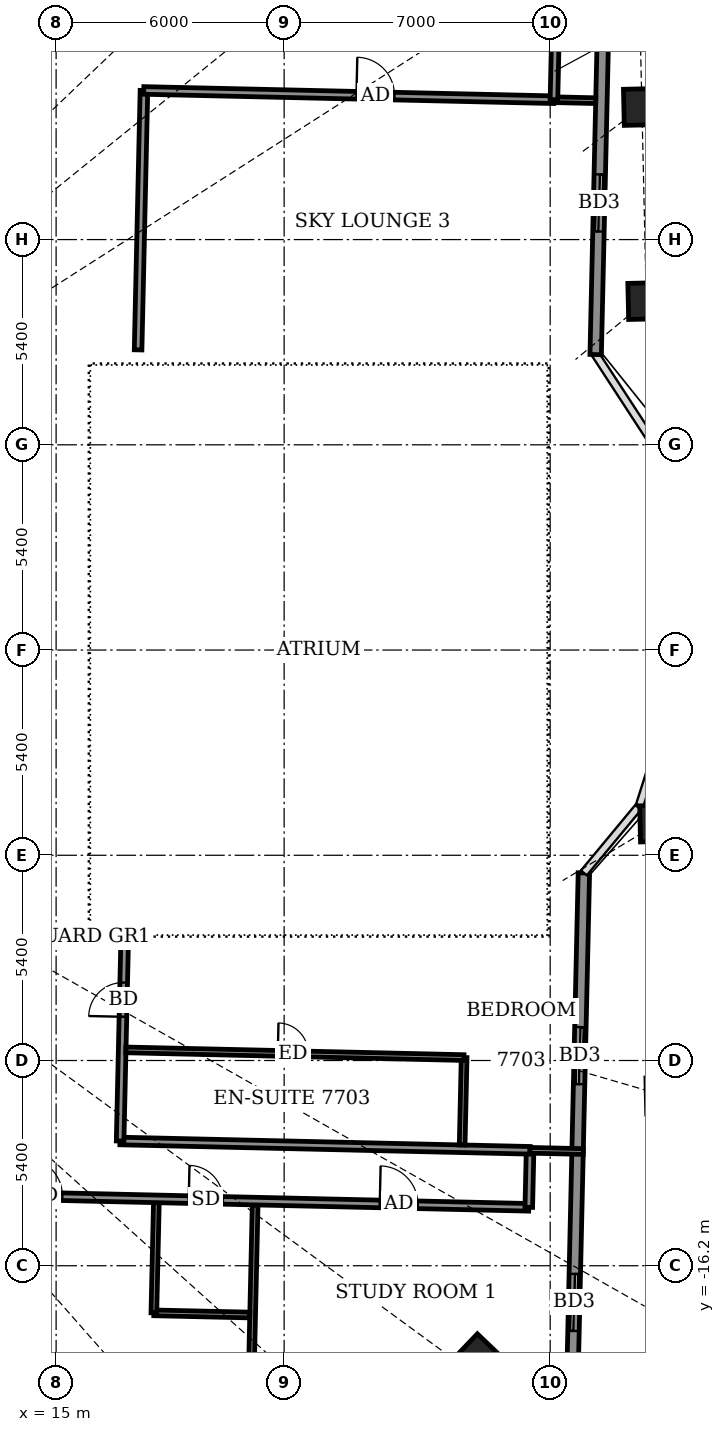
"""IFC4 building model, lengths in metres.
Left out: names, types, materials, properties, quantities, classifications, styles, units other than length and angle.
Written with IfcOpenShell. Run it as: python <this file> out.ifc"""

import sys

from ifc_helpers import new_model, si_unit, direction, frame, frame_2d, origin, origin_2d, place, context, subcontext, project, spatial, rectangle, extrude, element, fill, save


model = new_model("IFC4")
c1 = context("Model", 3, precision=1e-05, world=origin(), true_north=direction((0.0, 1.0)))
c2 = subcontext(c1, "Body", "Model", "MODEL_VIEW")
j1 = project(units=[si_unit("LENGTHUNIT", "METRE"), si_unit("PLANEANGLEUNIT", "RADIAN")], contexts=[c1])
p1 = place(None, origin())
s1 = spatial("IfcSite", under=j1, at=p1, CompositionType="ELEMENT")
p2 = place(p1, origin())
s2 = spatial("IfcBuilding", under=s1, at=p2, CompositionType="ELEMENT")
p3 = place(p2, frame((0.0, 0.0, 301.5)))
s3 = spatial("IfcBuildingStorey", under=s2, at=p3, CompositionType="ELEMENT", Elevation=301.5)
for number, where, z_axis, x_axis in (
    (1, (26.1, -18.664, -0.55), (0.0, 0.0, 1.0), (0.691, 0.723, 0.0)),
    (2, (30.841, -4.564, -0.55), (0.0, 0.0, 1.0), (-0.023, 1.0, 0.0)),
    (3, (30.529, 9.183, -0.55), (0.0, 0.0, 1.0), (-0.023, 1.0, 0.0)),
    (4, (30.414, 14.29, -0.55), (0.0, 0.0, 1.0), (-0.023, 1.0, 0.0)),
):
    element("IfcColumn", number, at=place(p3, frame(where, z_axis=z_axis, x_axis=x_axis)), inside=s3, PredefinedType="COLUMN", context=c2, shape_type="SweptSolid", body=[
        extrude(rectangle(XDim=0.95, YDim=0.95, at=origin_2d()), origin(), (0.0, 0.0, 1.0), 4.6),
    ])
p4 = place(p3, frame((28.544, -20.99, 0.0), z_axis=(0.0, 0.0, 1.0), x_axis=(0.02267155512, 0.999742967261, 0.0)))
e5 = element("IfcWall", 5, at=p4, inside=s3, PredefinedType="SOLIDWALL", context=c2, shape_type="SweptSolid", body=[
    extrude(rectangle(XDim=15.13, YDim=0.3, at=frame_2d((7.565, 0.0))), origin(), (0.0, 0.0, 1.0), 2.15),
])
p5 = place(p4, frame((3.075, 0.0, 0.0)))
e6 = element("IfcOpeningElement", 6, at=p5, cuts=e5, PredefinedType="OPENING", context=c2, shape_type="SweptSolid", body=[
    extrude(rectangle(XDim=1.5, YDim=2.0, at=frame_2d((0.75, 1.0))), frame((0.0, 0.16, 0.0), z_axis=(0.0, -1.0, 0.0), x_axis=(1.0, 0.0, 0.0)), (0.0, 0.0, 1.0), 0.32),
])
p6 = place(p4, frame((9.571, 0.0, 0.0)))
e7 = element("IfcOpeningElement", 7, at=p6, cuts=e5, PredefinedType="OPENING", context=c2, shape_type="SweptSolid", body=[
    extrude(rectangle(XDim=1.5, YDim=2.0, at=frame_2d((0.75, 1.0))), frame((0.0, 0.16, 0.0), z_axis=(0.0, -1.0, 0.0), x_axis=(1.0, 0.0, 0.0)), (0.0, 0.0, 1.0), 0.32),
])
p7 = place(p3, frame((29.197, 7.774, 0.0), z_axis=(0.0, 0.0, 1.0), x_axis=(0.022689772414, 0.999742553975, 0.0)))
e8 = element("IfcWall", 8, at=p7, inside=s3, PredefinedType="SOLIDWALL", context=c2, shape_type="SweptSolid", body=[
    extrude(rectangle(XDim=16.129, YDim=0.3, at=frame_2d((8.064, 0.0))), origin(), (0.0, 0.0, 1.0), 2.1),
])
p8 = place(p7, frame((3.241, 0.0, 0.0)))
e9 = element("IfcOpeningElement", 9, at=p8, cuts=e8, PredefinedType="OPENING", context=c2, shape_type="SweptSolid", body=[
    extrude(rectangle(XDim=1.5, YDim=2.0, at=frame_2d((0.75, 1.0))), frame((0.0, 0.16, 0.0), z_axis=(0.0, -1.0, 0.0), x_axis=(1.0, 0.0, 0.0)), (0.0, 0.0, 1.0), 0.32),
])
p9 = place(p7, frame((13.362, 0.0, 0.5)))
e10 = element("IfcOpeningElement", 10, at=p9, cuts=e8, PredefinedType="OPENING", context=c2, shape_type="SweptSolid", body=[
    extrude(rectangle(XDim=1.2, YDim=1.1, at=frame_2d((0.6, 0.55))), frame((0.0, 0.16, 0.0), z_axis=(0.0, -1.0, 0.0), x_axis=(1.0, 0.0, 0.0)), (0.0, 0.0, 1.0), 0.32),
])
p10 = place(p3, frame((19.977, -26.047, 0.0), z_axis=(0.0, 0.0, 1.0), x_axis=(0.022708327922, 0.999742132674, 0.0)))
e11 = element("IfcWall", 11, at=p10, inside=s3, PredefinedType="PARTITIONING", context=c2, shape_type="SweptSolid", body=[
    extrude(rectangle(XDim=11.45, YDim=0.15, at=frame_2d((5.725, 0.0))), origin(), (0.0, 0.0, 1.0), 2.15),
])
p11 = place(p3, frame((17.572, -17.44, 0.0), z_axis=(0.0, 0.0, 1.0), x_axis=(0.99974392816, -0.022629142889, 0.0)))
e12 = element("IfcWall", 12, at=p11, inside=s3, PredefinedType="PARTITIONING", context=c2, shape_type="SweptSolid", body=[
    extrude(rectangle(XDim=2.525, YDim=0.15, at=frame_2d((1.262, 0.0))), origin(), (0.0, 0.0, 1.0), 2.15),
])
p12 = place(p3, frame((17.572, -17.44, 0.0), z_axis=(0.0, 0.0, 1.0), x_axis=(0.022732880677, 0.999741574676, 0.0)))
e13 = element("IfcWall", 13, at=p12, inside=s3, PredefinedType="PARTITIONING", context=c2, shape_type="SweptSolid", body=[
    extrude(rectangle(XDim=2.9, YDim=0.15, at=frame_2d((1.45, 0.0))), origin(), (0.0, 0.0, 1.0), 2.15),
])
p13 = place(p3, frame((-27.058, -13.426, 0.0), z_axis=(0.0, 0.0, 1.0), x_axis=(0.999742445627, -0.022694545867, 0.0)))
e14 = element("IfcWall", 14, at=p13, inside=s3, PredefinedType="PARTITIONING", context=c2, shape_type="SweptSolid", body=[
    extrude(rectangle(XDim=54.509, YDim=0.2, at=frame_2d((27.255, 0.0))), origin(), (0.0, 0.0, 1.0), 2.15),
])
p14 = place(p13, frame((0.2, 0.0, 0.0)))
e15 = element("IfcOpeningElement", 15, at=p14, cuts=e14, PredefinedType="OPENING", context=c2, shape_type="SweptSolid", body=[
    extrude(rectangle(XDim=1.0, YDim=2.1, at=frame_2d((0.5, 1.05))), frame((0.0, 0.11, 0.0), z_axis=(0.0, -1.0, 0.0), x_axis=(1.0, 0.0, 0.0)), (0.0, 0.0, 1.0), 0.22),
])
p15 = place(p13, frame((4.809, 0.0, 0.0)))
e16 = element("IfcOpeningElement", 16, at=p15, cuts=e14, PredefinedType="OPENING", context=c2, shape_type="SweptSolid", body=[
    extrude(rectangle(XDim=0.9, YDim=2.1, at=frame_2d((0.45, 1.05))), frame((0.0, 0.11, 0.0), z_axis=(0.0, -1.0, 0.0), x_axis=(1.0, 0.0, 0.0)), (0.0, 0.0, 1.0), 0.22),
])
p16 = place(p13, frame((10.309, 0.0, 0.0)))
e17 = element("IfcOpeningElement", 17, at=p16, cuts=e14, PredefinedType="OPENING", context=c2, shape_type="SweptSolid", body=[
    extrude(rectangle(XDim=1.0, YDim=2.1, at=frame_2d((0.5, 1.05))), frame((0.0, 0.11, 0.0), z_axis=(0.0, -1.0, 0.0), x_axis=(1.0, 0.0, 0.0)), (0.0, 0.0, 1.0), 0.22),
])
p17 = place(p13, frame((7.309, 0.0, 0.0)))
e18 = element("IfcOpeningElement", 18, at=p17, cuts=e14, PredefinedType="OPENING", context=c2, shape_type="SweptSolid", body=[
    extrude(rectangle(XDim=0.9, YDim=2.1, at=frame_2d((0.45, 1.05))), frame((0.0, 0.11, 0.0), z_axis=(0.0, -1.0, 0.0), x_axis=(1.0, 0.0, 0.0)), (0.0, 0.0, 1.0), 0.22),
])
p18 = place(p13, frame((14.759, 0.0, 0.0)))
e19 = element("IfcOpeningElement", 19, at=p18, cuts=e14, PredefinedType="OPENING", context=c2, shape_type="SweptSolid", body=[
    extrude(rectangle(XDim=1.0, YDim=2.1, at=frame_2d((0.5, 1.05))), frame((0.0, 0.11, 0.0), z_axis=(0.0, -1.0, 0.0), x_axis=(1.0, 0.0, 0.0)), (0.0, 0.0, 1.0), 0.22),
])
p19 = place(p13, frame((18.609, 0.0, 0.0)))
e20 = element("IfcOpeningElement", 20, at=p19, cuts=e14, PredefinedType="OPENING", context=c2, shape_type="SweptSolid", body=[
    extrude(rectangle(XDim=0.9, YDim=2.1, at=frame_2d((0.45, 1.05))), frame((0.0, 0.11, 0.0), z_axis=(0.0, -1.0, 0.0), x_axis=(1.0, 0.0, 0.0)), (0.0, 0.0, 1.0), 0.22),
])
p20 = place(p13, frame((23.509, 0.0, 0.0)))
e21 = element("IfcOpeningElement", 21, at=p20, cuts=e14, PredefinedType="OPENING", context=c2, shape_type="SweptSolid", body=[
    extrude(rectangle(XDim=0.9, YDim=2.1, at=frame_2d((0.45, 1.05))), frame((0.0, 0.11, 0.0), z_axis=(0.0, -1.0, 0.0), x_axis=(1.0, 0.0, 0.0)), (0.0, 0.0, 1.0), 0.22),
])
p21 = place(p13, frame((26.109, 0.0, 0.0)))
e22 = element("IfcOpeningElement", 22, at=p21, cuts=e14, PredefinedType="OPENING", context=c2, shape_type="SweptSolid", body=[
    extrude(rectangle(XDim=0.9, YDim=2.1, at=frame_2d((0.45, 1.05))), frame((0.0, 0.11, 0.0), z_axis=(0.0, -1.0, 0.0), x_axis=(1.0, 0.0, 0.0)), (0.0, 0.0, 1.0), 0.22),
])
p22 = place(p13, frame((34.009, 0.0, 0.0)))
e23 = element("IfcOpeningElement", 23, at=p22, cuts=e14, PredefinedType="OPENING", context=c2, shape_type="SweptSolid", body=[
    extrude(rectangle(XDim=1.0, YDim=2.1, at=frame_2d((0.5, 1.05))), frame((0.0, 0.11, 0.0), z_axis=(0.0, -1.0, 0.0), x_axis=(1.0, 0.0, 0.0)), (0.0, 0.0, 1.0), 0.22),
])
p23 = place(p13, frame((41.234, 0.0, 0.0)))
e24 = element("IfcOpeningElement", 24, at=p23, cuts=e14, PredefinedType="OPENING", context=c2, shape_type="SweptSolid", body=[
    extrude(rectangle(XDim=1.0, YDim=2.1, at=frame_2d((0.5, 1.05))), frame((0.0, 0.11, 0.0), z_axis=(0.0, -1.0, 0.0), x_axis=(1.0, 0.0, 0.0)), (0.0, 0.0, 1.0), 0.22),
])
p24 = place(p13, frame((45.559, 0.0, 0.0)))
e25 = element("IfcOpeningElement", 25, at=p24, cuts=e14, PredefinedType="OPENING", context=c2, shape_type="SweptSolid", body=[
    extrude(rectangle(XDim=0.9, YDim=2.1, at=frame_2d((0.45, 1.05))), frame((0.0, 0.11, 0.0), z_axis=(0.0, -1.0, 0.0), x_axis=(1.0, 0.0, 0.0)), (0.0, 0.0, 1.0), 0.22),
])
p25 = place(p13, frame((50.587, 0.0, 0.0)))
e26 = element("IfcOpeningElement", 26, at=p25, cuts=e14, PredefinedType="OPENING", context=c2, shape_type="SweptSolid", body=[
    extrude(rectangle(XDim=1.0, YDim=2.1, at=frame_2d((0.5, 1.05))), frame((0.0, 0.11, 0.0), z_axis=(0.0, -1.0, 0.0), x_axis=(1.0, 0.0, 0.0)), (0.0, 0.0, 1.0), 0.22),
])
p26 = place(p3, frame((27.437, -14.663, 0.0), z_axis=(0.0, 0.0, 1.0), x_axis=(0.022617910375, 0.999744182344, 0.0)))
e27 = element("IfcWall", 27, at=p26, inside=s3, PredefinedType="PARTITIONING", context=c2, shape_type="SweptSolid", body=[
    extrude(rectangle(XDim=1.5, YDim=0.2, at=frame_2d((0.75, 0.0))), origin(), (0.0, 0.0, 1.0), 4.05),
])
p27 = place(p3, frame((16.679, -12.918, 0.0), z_axis=(0.0, 0.0, 1.0), x_axis=(0.999742162372, -0.022707020428, 0.0)))
e28 = element("IfcWall", 28, at=p27, inside=s3, PredefinedType="PARTITIONING", context=c2, shape_type="SweptSolid", body=[
    extrude(rectangle(XDim=10.795, YDim=0.2, at=frame_2d((5.397, 0.0))), origin(), (0.0, 0.0, 1.0), 2.15),
])
p28 = place(p3, frame((16.684, -12.919, 0.0), z_axis=(0.0, 0.0, 1.0), x_axis=(0.022667483124, 0.999743059595, 0.0)))
e29 = element("IfcWall", 29, at=p28, inside=s3, PredefinedType="PARTITIONING", context=c2, shape_type="SweptSolid", body=[
    extrude(rectangle(XDim=5.245, YDim=0.2, at=frame_2d((2.623, 0.0))), origin(), (0.0, 0.0, 1.0), 2.15),
])
p29 = place(p28, frame((3.27, 0.0, 0.0)))
e30 = element("IfcOpeningElement", 30, at=p29, cuts=e29, PredefinedType="OPENING", context=c2, shape_type="SweptSolid", body=[
    extrude(rectangle(XDim=0.9, YDim=2.1, at=frame_2d((0.45, 1.05))), frame((0.0, 0.11, 0.0), z_axis=(0.0, -1.0, 0.0), x_axis=(1.0, 0.0, 0.0)), (0.0, 0.0, 1.0), 0.22),
])
p30 = place(p3, frame((25.684, -13.023, 0.0), z_axis=(0.0, 0.0, 1.0), x_axis=(0.022603288534, 0.999744513037, 0.0)))
e31 = element("IfcWall", 31, at=p30, inside=s3, PredefinedType="PARTITIONING", context=c2, shape_type="SweptSolid", body=[
    extrude(rectangle(XDim=2.301, YDim=0.15, at=frame_2d((1.15, 0.0))), origin(), (0.0, 0.0, 1.0), 4.05),
])
p31 = place(p3, frame((27.467, -13.163, 0.0), z_axis=(0.0, 0.0, 1.0), x_axis=(0.999740667531, -0.022772739949, 0.0)))
e32 = element("IfcWall", 32, at=p31, inside=s3, PredefinedType="PARTITIONING", context=c2, shape_type="SweptSolid", body=[
    extrude(rectangle(XDim=1.404, YDim=0.15, at=frame_2d((0.702, 0.0))), origin(), (0.0, 0.0, 1.0), 4.05),
])
p32 = place(p3, frame((16.834, -10.521, 0.0), z_axis=(0.0, 0.0, 1.0), x_axis=(0.999742599783, -0.022687753966, 0.0)))
e33 = element("IfcWall", 33, at=p32, inside=s3, PredefinedType="PARTITIONING", context=c2, shape_type="SweptSolid", body=[
    extrude(rectangle(XDim=8.899, YDim=0.15, at=frame_2d((4.45, 0.0))), origin(), (0.0, 0.0, 1.0), 2.15),
])
p33 = place(p32, frame((4.0, 0.0, 0.0)))
e34 = element("IfcOpeningElement", 34, at=p33, cuts=e33, PredefinedType="OPENING", context=c2, shape_type="SweptSolid", body=[
    extrude(rectangle(XDim=0.8, YDim=2.1, at=frame_2d((0.4, 1.05))), frame((0.0, 0.085, 0.0), z_axis=(0.0, -1.0, 0.0), x_axis=(1.0, 0.0, 0.0)), (0.0, 0.0, 1.0), 0.17),
])
p34 = place(p3, frame((17.157, 7.898, 0.0), z_axis=(0.0, 0.0, 1.0), x_axis=(0.022562209343, 0.999745440955, 0.0)))
e35 = element("IfcWall", 35, at=p34, inside=s3, PredefinedType="PARTITIONING", context=c2, shape_type="SweptSolid", body=[
    extrude(rectangle(XDim=6.828, YDim=0.2, at=frame_2d((3.414, 0.0))), origin(), (0.0, 0.0, 1.0), 2.1),
])
p35 = place(p3, frame((17.306, 14.724, 0.0), z_axis=(0.0, 0.0, 1.0), x_axis=(0.999744269809, -0.022614043969, 0.0)))
e36 = element("IfcWall", 36, at=p35, inside=s3, PredefinedType="PARTITIONING", context=c2, shape_type="SweptSolid", body=[
    extrude(rectangle(XDim=10.796, YDim=0.2, at=frame_2d((5.398, 0.0))), origin(), (0.0, 0.0, 1.0), 2.1),
])
p36 = place(p35, frame((5.598, 0.0, 0.0)))
e37 = element("IfcOpeningElement", 37, at=p36, cuts=e36, PredefinedType="OPENING", context=c2, shape_type="SweptSolid", body=[
    extrude(rectangle(XDim=1.0, YDim=2.1, at=frame_2d((0.5, 1.05))), frame((0.0, 0.11, 0.0), z_axis=(0.0, -1.0, 0.0), x_axis=(1.0, 0.0, 0.0)), (0.0, 0.0, 1.0), 0.22),
])
p37 = place(p3, frame((28.099, 14.48, 0.0), z_axis=(0.0, 0.0, 1.0), x_axis=(0.999743779532, -0.022635708216, 0.0)))
e38 = element("IfcWall", 38, at=p37, inside=s3, PredefinedType="PARTITIONING", context=c2, shape_type="SweptSolid", body=[
    extrude(rectangle(XDim=1.1, YDim=0.15, at=frame_2d((0.55, 0.0))), origin(), (0.0, 0.0, 1.0), 4.05),
])
p38 = place(p3, frame((28.099, 14.48, 0.0), z_axis=(0.0, 0.0, 1.0), x_axis=(0.022632637625, 0.99974384905, 0.0)))
e39 = element("IfcWall", 39, at=p38, inside=s3, PredefinedType="PARTITIONING", context=c2, shape_type="SweptSolid", body=[
    extrude(rectangle(XDim=1.5, YDim=0.2, at=frame_2d((0.75, 0.0))), origin(), (0.0, 0.0, 1.0), 4.05),
])
p39 = place(p5, origin())
e40 = element("IfcDoor", 40, at=p39, inside=s3, OperationType="SLIDING_TO_LEFT", PredefinedType="DOOR", context=c2, shape_type="SweptSolid", body=[
    extrude(rectangle(XDim=1.5, YDim=2.0, at=frame_2d((0.75, 1.0))), frame((0.0, 0.025, 0.0), z_axis=(0.0, -1.0, 0.0), x_axis=(1.0, 0.0, 0.0)), (0.0, 0.0, 1.0), 0.05),
])
fill(e6, e40)
p40 = place(p6, origin())
e41 = element("IfcDoor", 41, at=p40, inside=s3, OperationType="SLIDING_TO_LEFT", PredefinedType="DOOR", context=c2, shape_type="SweptSolid", body=[
    extrude(rectangle(XDim=1.5, YDim=2.0, at=frame_2d((0.75, 1.0))), frame((0.0, 0.025, 0.0), z_axis=(0.0, -1.0, 0.0), x_axis=(1.0, 0.0, 0.0)), (0.0, 0.0, 1.0), 0.05),
])
fill(e7, e41)
p41 = place(p8, origin())
e42 = element("IfcDoor", 42, at=p41, inside=s3, OperationType="SLIDING_TO_LEFT", PredefinedType="DOOR", context=c2, shape_type="SweptSolid", body=[
    extrude(rectangle(XDim=1.5, YDim=2.0, at=frame_2d((0.75, 1.0))), frame((0.0, 0.025, 0.0), z_axis=(0.0, -1.0, 0.0), x_axis=(1.0, 0.0, 0.0)), (0.0, 0.0, 1.0), 0.05),
])
fill(e9, e42)
p42 = place(p23, origin())
e43 = element("IfcDoor", 43, at=p42, inside=s3, OperationType="SINGLE_SWING_LEFT", PredefinedType="DOOR", context=c2, shape_type="SweptSolid", body=[
    extrude(rectangle(XDim=1.0, YDim=2.1, at=frame_2d((0.5, 1.05))), frame((0.0, 0.025, 0.0), z_axis=(0.0, -1.0, 0.0), x_axis=(1.0, 0.0, 0.0)), (0.0, 0.0, 1.0), 0.05),
])
fill(e24, e43)
p43 = place(p24, origin())
e44 = element("IfcDoor", 44, at=p43, inside=s3, OperationType="SINGLE_SWING_RIGHT", PredefinedType="DOOR", context=c2, shape_type="SweptSolid", body=[
    extrude(rectangle(XDim=0.9, YDim=2.1, at=frame_2d((0.45, 1.05))), frame((0.0, 0.025, 0.0), z_axis=(0.0, -1.0, 0.0), x_axis=(1.0, 0.0, 0.0)), (0.0, 0.0, 1.0), 0.05),
])
fill(e25, e44)
p44 = place(p25, origin())
e45 = element("IfcDoor", 45, at=p44, inside=s3, OperationType="SINGLE_SWING_RIGHT", PredefinedType="DOOR", context=c2, shape_type="SweptSolid", body=[
    extrude(rectangle(XDim=1.0, YDim=2.1, at=frame_2d((0.5, 1.05))), frame((0.0, 0.025, 0.0), z_axis=(0.0, -1.0, 0.0), x_axis=(1.0, 0.0, 0.0)), (0.0, 0.0, 1.0), 0.05),
])
fill(e26, e45)
p45 = place(p29, origin())
e46 = element("IfcDoor", 46, at=p45, inside=s3, OperationType="SINGLE_SWING_LEFT", PredefinedType="DOOR", context=c2, shape_type="SweptSolid", body=[
    extrude(rectangle(XDim=0.9, YDim=2.1, at=frame_2d((0.45, 1.05))), frame((0.0, 0.025, 0.0), z_axis=(0.0, -1.0, 0.0), x_axis=(1.0, 0.0, 0.0)), (0.0, 0.0, 1.0), 0.05),
])
fill(e30, e46)
p46 = place(p33, origin())
e47 = element("IfcDoor", 47, at=p46, inside=s3, OperationType="SINGLE_SWING_LEFT", PredefinedType="DOOR", context=c2, shape_type="SweptSolid", body=[
    extrude(rectangle(XDim=0.8, YDim=2.1, at=frame_2d((0.4, 1.05))), frame((0.0, 0.025, 0.0), z_axis=(0.0, -1.0, 0.0), x_axis=(1.0, 0.0, 0.0)), (0.0, 0.0, 1.0), 0.05),
])
fill(e34, e47)
p47 = place(p36, origin())
e48 = element("IfcDoor", 48, at=p47, inside=s3, OperationType="SINGLE_SWING_LEFT", PredefinedType="DOOR", context=c2, shape_type="SweptSolid", body=[
    extrude(rectangle(XDim=1.0, YDim=2.1, at=frame_2d((0.5, 1.05))), frame((0.0, 0.025, 0.0), z_axis=(0.0, -1.0, 0.0), x_axis=(1.0, 0.0, 0.0)), (0.0, 0.0, 1.0), 0.05),
])
fill(e37, e48)
save(model, sys.argv[1])
